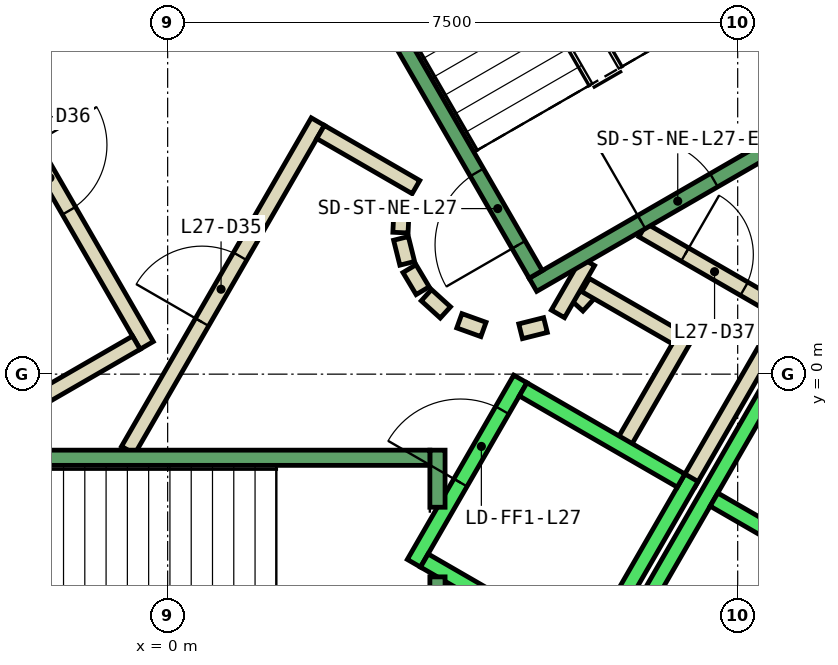
"""IFC4 building model, lengths in metres.
Left out: names, types, materials, properties, quantities, classifications, styles, units other than length and angle.
Written with IfcOpenShell. Run it as: python <this file> out.ifc"""

import sys

from ifc_helpers import new_model, si_unit, direction, frame, frame_2d, origin, place, context, subcontext, project, spatial, rectangle, extrude, element, fill, save


model = new_model("IFC4")
c1 = context("Model", 3, precision=1e-05, world=origin(), true_north=direction((0.0, 1.0)))
c2 = subcontext(c1, "Body", "Model", "MODEL_VIEW")
j1 = project(units=[si_unit("LENGTHUNIT", "METRE"), si_unit("PLANEANGLEUNIT", "RADIAN")], contexts=[c1])
p1 = place(None, origin())
s1 = spatial("IfcSite", under=j1, at=p1, CompositionType="ELEMENT")
p2 = place(p1, origin())
s2 = spatial("IfcBuilding", under=s1, at=p2, CompositionType="ELEMENT")
p3 = place(p2, frame((0.0, 0.0, 124.4)))
s3 = spatial("IfcBuildingStorey", under=s2, at=p3, CompositionType="ELEMENT", Elevation=124.4)
p4 = place(p3, frame((5.39, 0.898, 0.0), z_axis=(0.0, 0.0, 1.0), x_axis=(0.673828488714, 0.738887791073, 0.0)))
e1 = element("IfcWall", 1, at=p4, inside=s3, PredefinedType="PARTITIONING", context=c2, shape_type="SweptSolid", body=[
    extrude(rectangle(XDim=0.263, YDim=0.2, at=frame_2d((0.131, 0.0))), origin(), (0.0, 0.0, 1.0), 3.8),
])
p5 = place(p3, frame((5.499, 1.172, 0.0), z_axis=(0.0, 0.0, 1.0), x_axis=(0.866333505267, -0.499465972466, 0.0)))
e2 = element("IfcWall", 2, at=p5, inside=s3, PredefinedType="PARTITIONING", context=c2, shape_type="SweptSolid", body=[
    extrude(rectangle(XDim=1.374, YDim=0.2, at=frame_2d((0.687, 0.0))), origin(), (0.0, 0.0, 1.0), 3.8),
])
p6 = place(p3, frame((6.826, 0.522, 0.0), z_axis=(0.0, 0.0, 1.0), x_axis=(-0.500016722714, -0.866015748706, 0.0)))
e3 = element("IfcWall", 3, at=p6, inside=s3, PredefinedType="PARTITIONING", context=c2, shape_type="SweptSolid", body=[
    extrude(rectangle(XDim=1.7, YDim=0.2, at=frame_2d((0.85, 0.0))), origin(), (0.0, 0.0, 1.0), 3.8),
])
p7 = place(p3, frame((6.25, 1.894, 0.0), z_axis=(0.0, 0.0, 1.0), x_axis=(0.866043184279, -0.499969202016, 0.0)))
e4 = element("IfcWall", 4, at=p7, inside=s3, PredefinedType="PARTITIONING", context=c2, shape_type="SweptSolid", body=[
    extrude(rectangle(XDim=2.084, YDim=0.2, at=frame_2d((1.042, 0.0))), origin(), (0.0, 0.0, 1.0), 3.8),
])
p8 = place(p7, frame((0.642, 0.0, 0.0)))
e5 = element("IfcOpeningElement", 5, at=p8, cuts=e4, PredefinedType="OPENING", context=c2, shape_type="SweptSolid", body=[
    extrude(rectangle(XDim=0.9, YDim=2.1, at=frame_2d((0.45, 1.05))), frame((0.0, 0.11, 0.0), z_axis=(0.0, -1.0, 0.0), x_axis=(1.0, 0.0, 0.0)), (0.0, 0.0, 1.0), 0.22),
])
p9 = place(p3, frame((8.192, 0.888, 0.0), z_axis=(0.0, 0.0, 1.0), x_axis=(-0.499940625693, -0.866059680843, 0.0)))
e6 = element("IfcWall", 6, at=p9, inside=s3, PredefinedType="PARTITIONING", context=c2, shape_type="SweptSolid", body=[
    extrude(rectangle(XDim=2.68, YDim=0.2, at=frame_2d((1.34, 0.0))), origin(), (0.0, 0.0, 1.0), 3.8),
])
p10 = place(p3, frame((5.135, 0.793, 0.0), z_axis=(0.0, 0.0, 1.0), x_axis=(0.499526442893, 0.866298639529, 0.0)))
e7 = element("IfcWall", 7, at=p10, inside=s3, PredefinedType="PARTITIONING", context=c2, shape_type="SweptSolid", body=[
    extrude(rectangle(XDim=0.791, YDim=0.2, at=frame_2d((0.396, 0.0))), origin(), (0.0, 0.0, 1.0), 3.8),
])
p11 = place(p3, frame((-0.52, -1.0, 0.0), z_axis=(0.0, 0.0, 1.0), x_axis=(0.50011622646, 0.865958290007, 0.0)))
e8 = element("IfcWall", 8, at=p11, inside=s3, PredefinedType="PARTITIONING", context=c2, shape_type="SweptSolid", body=[
    extrude(rectangle(XDim=4.991, YDim=0.2, at=frame_2d((2.496, 0.0))), origin(), (0.0, 0.0, 1.0), 3.8),
])
p12 = place(p11, frame((1.945, 0.0, 0.0)))
e9 = element("IfcOpeningElement", 9, at=p12, cuts=e8, PredefinedType="OPENING", context=c2, shape_type="SweptSolid", body=[
    extrude(rectangle(XDim=1.0, YDim=2.1, at=frame_2d((0.5, 1.05))), frame((0.0, 0.11, 0.0), z_axis=(0.0, -1.0, 0.0), x_axis=(1.0, 0.0, 0.0)), (0.0, 0.0, 1.0), 0.22),
])
p13 = place(p3, frame((2.012, 3.186, 0.0), z_axis=(0.0, 0.0, 1.0), x_axis=(0.865891012941, -0.500232699559, 0.0)))
e10 = element("IfcWall", 10, at=p13, inside=s3, PredefinedType="PARTITIONING", context=c2, shape_type="SweptSolid", body=[
    extrude(rectangle(XDim=1.449, YDim=0.2, at=frame_2d((0.725, 0.0))), origin(), (0.0, 0.0, 1.0), 3.8),
])
p14 = place(p3, frame((3.079, 2.199, 0.0), z_axis=(0.0, 0.0, 1.0), x_axis=(-0.047771483479, -0.998858290933, 0.0)))
e11 = element("IfcWall", 11, at=p14, inside=s3, PredefinedType="PARTITIONING", context=c2, shape_type="SweptSolid", body=[
    extrude(rectangle(XDim=0.337, YDim=0.2, at=frame_2d((0.169, 0.0))), origin(), (0.0, 0.0, 1.0), 3.8),
])
p15 = place(p3, frame((3.07, 1.786, 0.0), z_axis=(0.0, 0.0, 1.0), x_axis=(0.242705583207, -0.970099994784, 0.0)))
e12 = element("IfcWall", 12, at=p15, inside=s3, PredefinedType="PARTITIONING", context=c2, shape_type="SweptSolid", body=[
    extrude(rectangle(XDim=0.338, YDim=0.2, at=frame_2d((0.169, 0.0))), origin(), (0.0, 0.0, 1.0), 3.8),
])
for number, where, z_axis, x_axis in (
    (13, (3.182, 1.388, 0.0), (0.0, 0.0, 1.0), (0.512, -0.859, 0.0)),
    (14, (3.404, 1.039, 0.0), (0.0, 0.0, 1.0), (0.74, -0.672, 0.0)),
):
    element("IfcWall", number, at=place(p3, frame(where, z_axis=z_axis, x_axis=x_axis)), inside=s3, PredefinedType="PARTITIONING", context=c2, shape_type="SweptSolid", body=[
        extrude(rectangle(XDim=0.338, YDim=0.2, at=frame_2d((0.169, 0.0))), origin(), (0.0, 0.0, 1.0), 3.8),
    ])
p16 = place(p3, frame((3.838, 0.702, 0.0), z_axis=(0.0, 0.0, 1.0), x_axis=(0.941035081519, -0.338308993895, 0.0)))
e15 = element("IfcWall", 15, at=p16, inside=s3, PredefinedType="PARTITIONING", context=c2, shape_type="SweptSolid", body=[
    extrude(rectangle(XDim=0.337, YDim=0.2, at=frame_2d((0.168, 0.0))), origin(), (0.0, 0.0, 1.0), 3.8),
])
p17 = place(p3, frame((4.644, 0.564, 0.0), z_axis=(0.0, 0.0, 1.0), x_axis=(0.969929076366, 0.243387729394, 0.0)))
e16 = element("IfcWall", 16, at=p17, inside=s3, PredefinedType="PARTITIONING", context=c2, shape_type="SweptSolid", body=[
    extrude(rectangle(XDim=0.337, YDim=0.2, at=frame_2d((0.168, 0.0))), origin(), (0.0, 0.0, 1.0), 3.8),
])
p18 = place(p3, frame((-2.771, 4.7, 0.0), z_axis=(0.0, 0.0, 1.0), x_axis=(0.499969479948, -0.866043023828, 0.0)))
e17 = element("IfcWall", 17, at=p18, inside=s3, PredefinedType="PARTITIONING", context=c2, shape_type="SweptSolid", body=[
    extrude(rectangle(XDim=4.99, YDim=0.2, at=frame_2d((2.495, 0.0))), origin(), (0.0, 0.0, 1.0), 3.8),
])
p19 = place(p18, frame((1.945, 0.0, 0.0)))
e18 = element("IfcOpeningElement", 18, at=p19, cuts=e17, PredefinedType="OPENING", context=c2, shape_type="SweptSolid", body=[
    extrude(rectangle(XDim=1.0, YDim=2.1, at=frame_2d((0.5, 1.05))), frame((0.0, 0.11, 0.0), z_axis=(0.0, -1.0, 0.0), x_axis=(1.0, 0.0, 0.0)), (0.0, 0.0, 1.0), 0.22),
])
p20 = place(p3, frame((-0.412, 0.414, 0.0), z_axis=(0.0, 0.0, 1.0), x_axis=(-0.866017369001, -0.500013916395, 0.0)))
e19 = element("IfcWall", 19, at=p20, inside=s3, PredefinedType="PARTITIONING", context=c2, shape_type="SweptSolid", body=[
    extrude(rectangle(XDim=1.45, YDim=0.2, at=frame_2d((0.725, 0.0))), origin(), (0.0, 0.0, 1.0), 3.8),
])
p21 = place(p3, frame((3.24, -2.488, 0.0), z_axis=(0.0, 0.0, 1.0), x_axis=(0.49994636267, 0.866056369097, 0.0)))
e20 = element("IfcWall", 20, at=p21, inside=s3, PredefinedType="STANDARD", context=c2, shape_type="SweptSolid", body=[
    extrude(rectangle(XDim=2.8, YDim=0.2, at=frame_2d((1.4, 0.0))), origin(), (0.0, 0.0, 1.0), 3.8),
])
p22 = place(p21, frame((1.225, 0.0, 0.0)))
e21 = element("IfcOpeningElement", 21, at=p22, cuts=e20, PredefinedType="OPENING", context=c2, shape_type="SweptSolid", body=[
    extrude(rectangle(XDim=1.1, YDim=2.1, at=frame_2d((0.55, 1.05))), frame((0.0, 0.11, 0.0), z_axis=(0.0, -1.0, 0.0), x_axis=(1.0, 0.0, 0.0)), (0.0, 0.0, 1.0), 0.22),
])
p23 = place(p3, frame((5.492, -3.788, 0.0), z_axis=(0.0, 0.0, 1.0), x_axis=(0.500011755427, 0.866018616679, 0.0)))
e22 = element("IfcWall", 22, at=p23, inside=s3, PredefinedType="STANDARD", context=c2, shape_type="SweptSolid", body=[
    extrude(rectangle(XDim=2.8, YDim=0.2, at=frame_2d((1.4, 0.0))), origin(), (0.0, 0.0, 1.0), 3.8),
])
p24 = place(p3, frame((3.377, -2.452, 0.0), z_axis=(0.0, 0.0, 1.0), x_axis=(0.865955154139, -0.50012165622, 0.0)))
e23 = element("IfcWall", 23, at=p24, inside=s3, PredefinedType="STANDARD", context=c2, shape_type="SweptSolid", body=[
    extrude(rectangle(XDim=2.4, YDim=0.2, at=frame_2d((1.2, 0.0))), origin(), (0.0, 0.0, 1.0), 3.8),
])
p25 = place(p3, frame((4.677, -0.2, 0.0), z_axis=(0.0, 0.0, 1.0), x_axis=(0.865973769406, -0.500089422704, 0.0)))
e24 = element("IfcWall", 24, at=p25, inside=s3, PredefinedType="STANDARD", context=c2, shape_type="SweptSolid", body=[
    extrude(rectangle(XDim=2.399, YDim=0.2, at=frame_2d((1.2, 0.0))), origin(), (0.0, 0.0, 1.0), 3.8),
])
p26 = place(p3, frame((4.451, -6.19, 0.0), z_axis=(0.0, 0.0, 1.0), x_axis=(0.50000090737, 0.866024879913, 0.0)))
e25 = element("IfcWall", 25, at=p26, inside=s3, PredefinedType="STANDARD", context=c2, shape_type="SweptSolid", body=[
    extrude(rectangle(XDim=10.6, YDim=0.2, at=frame_2d((5.3, 0.0))), origin(), (0.0, 0.0, 1.0), 3.8),
])
p27 = place(p3, frame((7.188, -1.65, 0.0), z_axis=(0.0, 0.0, 1.0), x_axis=(0.866022959057, -0.500004234368, 0.0)))
e26 = element("IfcWall", 26, at=p27, inside=s3, PredefinedType="STANDARD", context=c2, shape_type="SweptSolid", body=[
    extrude(rectangle(XDim=2.5, YDim=0.2, at=frame_2d((1.25, 0.0))), origin(), (0.0, 0.0, 1.0), 3.8),
])
p28 = place(p3, frame((3.55, -2.667, 0.0), z_axis=(0.0, 0.0, 1.0), x_axis=(0.0, -1.0, 0.0)))
e27 = element("IfcWall", 27, at=p28, inside=s3, PredefinedType="STANDARD", context=c2, shape_type="SweptSolid", body=[
    extrude(rectangle(XDim=2.733, YDim=0.2, at=frame_2d((1.366, 0.0))), origin(), (0.0, 0.0, 1.0), 3.8),
])
p29 = place(p3, frame((3.55, -1.0, 0.0), z_axis=(0.0, 0.0, 1.0), x_axis=(0.0, -1.0, 0.0)))
e28 = element("IfcWall", 28, at=p29, inside=s3, PredefinedType="STANDARD", context=c2, shape_type="SweptSolid", body=[
    extrude(rectangle(XDim=0.751, YDim=0.2, at=frame_2d((0.375, 0.0))), origin(), (0.0, 0.0, 1.0), 3.8),
])
p30 = place(p3, frame((-3.45, -1.1, 0.0), z_axis=(0.0, 0.0, 1.0), x_axis=(1.0, 0.0, 0.0)))
e29 = element("IfcWall", 29, at=p30, inside=s3, PredefinedType="STANDARD", context=c2, shape_type="SweptSolid", body=[
    extrude(rectangle(XDim=6.9, YDim=0.2, at=frame_2d((3.45, 0.0))), origin(), (0.0, 0.0, 1.0), 3.8),
])
p31 = place(p30, frame((0.45, 0.0, 0.0)))
e30 = element("IfcOpeningElement", 30, at=p31, cuts=e29, PredefinedType="OPENING", context=c2, shape_type="SweptSolid", body=[
    extrude(rectangle(XDim=1.1, YDim=2.2, at=frame_2d((0.55, 1.1))), frame((0.0, 0.11, 0.0), z_axis=(0.0, -1.0, 0.0), x_axis=(1.0, 0.0, 0.0)), (0.0, 0.0, 1.0), 0.22),
])
p32 = place(p3, frame((4.806, 1.176, 0.0), z_axis=(0.0, 0.0, 1.0), x_axis=(0.866059941101, 0.499940174841, 0.0)))
e31 = element("IfcWall", 31, at=p32, inside=s3, PredefinedType="STANDARD", context=c2, shape_type="SweptSolid", body=[
    extrude(rectangle(XDim=4.4, YDim=0.2, at=frame_2d((2.2, 0.0))), origin(), (0.0, 0.0, 1.0), 3.8),
])
p33 = place(p32, frame((1.65, 0.0, 0.0)))
e32 = element("IfcOpeningElement", 32, at=p33, cuts=e31, PredefinedType="OPENING", context=c2, shape_type="SweptSolid", body=[
    extrude(rectangle(XDim=1.1, YDim=2.2, at=frame_2d((0.55, 1.1))), frame((0.0, 0.11, 0.0), z_axis=(0.0, -1.0, 0.0), x_axis=(1.0, 0.0, 0.0)), (0.0, 0.0, 1.0), 0.22),
])
p34 = place(p3, frame((4.843, 1.312, 0.0), z_axis=(0.0, 0.0, 1.0), x_axis=(-0.499963383562, 0.866046543262, 0.0)))
e33 = element("IfcWall", 33, at=p34, inside=s3, PredefinedType="STANDARD", context=c2, shape_type="SweptSolid", body=[
    extrude(rectangle(XDim=6.9, YDim=0.2, at=frame_2d((3.45, 0.0))), origin(), (0.0, 0.0, 1.0), 3.8),
])
p35 = place(p34, frame((0.45, 0.0, 0.0)))
e34 = element("IfcOpeningElement", 34, at=p35, cuts=e33, PredefinedType="OPENING", context=c2, shape_type="SweptSolid", body=[
    extrude(rectangle(XDim=1.1, YDim=2.2, at=frame_2d((0.55, 1.1))), frame((0.0, 0.11, 0.0), z_axis=(0.0, -1.0, 0.0), x_axis=(1.0, 0.0, 0.0)), (0.0, 0.0, 1.0), 0.22),
])
p36 = place(p3, frame((8.48, 3.412, 0.0), z_axis=(0.0, 0.0, 1.0), x_axis=(-0.499978703459, 0.866037698999, 0.0)))
e35 = element("IfcWall", 35, at=p36, inside=s3, PredefinedType="STANDARD", context=c2, shape_type="SweptSolid", body=[
    extrude(rectangle(XDim=6.9, YDim=0.2, at=frame_2d((3.45, 0.0))), origin(), (0.0, 0.0, 1.0), 3.8),
])
p37 = place(p3, frame((-1.393, 7.288, 0.0), z_axis=(0.0, 0.0, 1.0), x_axis=(-0.499963383562, -0.866046543262, 0.0)))
e36 = element("IfcWall", 36, at=p37, inside=s3, PredefinedType="STANDARD", context=c2, shape_type="SweptSolid", body=[
    extrude(rectangle(XDim=6.9, YDim=0.2, at=frame_2d((3.45, 0.0))), origin(), (0.0, 0.0, 1.0), 3.8),
])
p38 = place(p37, frame((0.45, 0.0, 0.0)))
e37 = element("IfcOpeningElement", 37, at=p38, cuts=e36, PredefinedType="OPENING", context=c2, shape_type="SweptSolid", body=[
    extrude(rectangle(XDim=1.1, YDim=2.2, at=frame_2d((0.55, 1.1))), frame((0.0, 0.11, 0.0), z_axis=(0.0, -1.0, 0.0), x_axis=(1.0, 0.0, 0.0)), (0.0, 0.0, 1.0), 0.22),
])
p39 = place(p12, origin())
e38 = element("IfcDoor", 38, at=p39, inside=s3, OperationType="SINGLE_SWING_LEFT", PredefinedType="DOOR", context=c2, shape_type="SweptSolid", body=[
    extrude(rectangle(XDim=1.0, YDim=2.1, at=frame_2d((0.5, 1.05))), frame((0.0, 0.025, 0.0), z_axis=(0.0, -1.0, 0.0), x_axis=(1.0, 0.0, 0.0)), (0.0, 0.0, 1.0), 0.05),
])
fill(e9, e38)
p40 = place(p19, origin())
e39 = element("IfcDoor", 39, at=p40, inside=s3, OperationType="SINGLE_SWING_RIGHT", PredefinedType="DOOR", context=c2, shape_type="SweptSolid", body=[
    extrude(rectangle(XDim=1.0, YDim=2.1, at=frame_2d((0.5, 1.05))), frame((0.0, 0.025, 0.0), z_axis=(0.0, -1.0, 0.0), x_axis=(1.0, 0.0, 0.0)), (0.0, 0.0, 1.0), 0.05),
])
fill(e18, e39)
p41 = place(p8, origin())
e40 = element("IfcDoor", 40, at=p41, inside=s3, OperationType="SINGLE_SWING_LEFT", PredefinedType="DOOR", context=c2, shape_type="SweptSolid", body=[
    extrude(rectangle(XDim=0.9, YDim=2.1, at=frame_2d((0.45, 1.05))), frame((0.0, 0.025, 0.0), z_axis=(0.0, -1.0, 0.0), x_axis=(1.0, 0.0, 0.0)), (0.0, 0.0, 1.0), 0.05),
])
fill(e5, e40)
p42 = place(p22, origin())
e41 = element("IfcDoor", 41, at=p42, inside=s3, OperationType="SLIDING_TO_LEFT", PredefinedType="DOOR", context=c2, shape_type="SweptSolid", body=[
    extrude(rectangle(XDim=1.1, YDim=2.1, at=frame_2d((0.55, 1.05))), frame((0.0, 0.025, 0.0), z_axis=(0.0, -1.0, 0.0), x_axis=(1.0, 0.0, 0.0)), (0.0, 0.0, 1.0), 0.05),
])
fill(e21, e41)
p43 = place(p35, origin())
e42 = element("IfcDoor", 42, at=p43, inside=s3, OperationType="SINGLE_SWING_LEFT", PredefinedType="DOOR", context=c2, shape_type="SweptSolid", body=[
    extrude(rectangle(XDim=1.1, YDim=2.2, at=frame_2d((0.55, 1.1))), frame((0.0, 0.025, 0.0), z_axis=(0.0, -1.0, 0.0), x_axis=(1.0, 0.0, 0.0)), (0.0, 0.0, 1.0), 0.05),
])
fill(e34, e42)
p44 = place(p33, origin())
e43 = element("IfcDoor", 43, at=p44, inside=s3, OperationType="SINGLE_SWING_LEFT", PredefinedType="DOOR", context=c2, shape_type="SweptSolid", body=[
    extrude(rectangle(XDim=1.1, YDim=2.2, at=frame_2d((0.55, 1.1))), frame((0.0, 0.025, 0.0), z_axis=(0.0, -1.0, 0.0), x_axis=(1.0, 0.0, 0.0)), (0.0, 0.0, 1.0), 0.05),
])
fill(e32, e43)
save(model, sys.argv[1])
